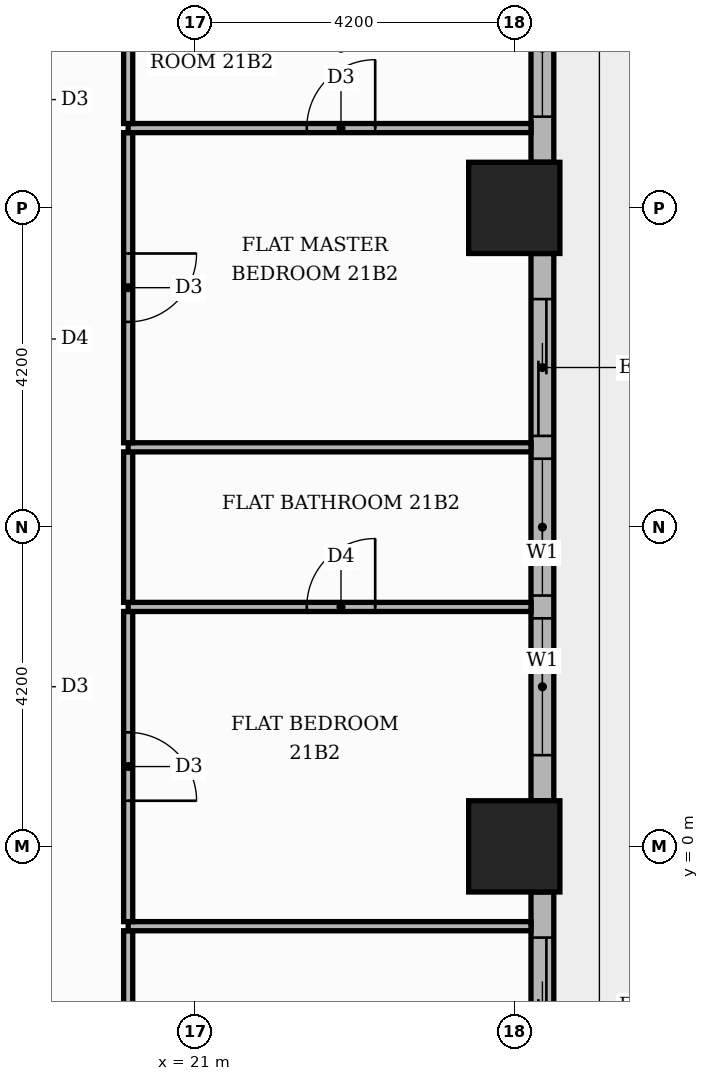
"""IFC4 building model, lengths in metres.
Left out: names, types, materials, properties, quantities, classifications, styles, units other than length and angle.
Written with IfcOpenShell. Run it as: python <this file> out.ifc"""

import sys

from ifc_helpers import new_model, si_unit, direction, frame, frame_2d, origin, origin_2d, place, context, subcontext, project, spatial, rectangle, extrude, element, fill, save


model = new_model("IFC4")
c1 = context("Model", 3, precision=1e-05, world=origin(), true_north=direction((0.0, 1.0)))
c2 = subcontext(c1, "Body", "Model", "MODEL_VIEW")
j1 = project(units=[si_unit("LENGTHUNIT", "METRE"), si_unit("PLANEANGLEUNIT", "RADIAN")], contexts=[c1])
p1 = place(None, origin())
s1 = spatial("IfcSite", under=j1, at=p1, CompositionType="ELEMENT")
p2 = place(p1, origin())
s2 = spatial("IfcBuilding", under=s1, at=p2, CompositionType="ELEMENT")
p3 = place(p2, frame((0.0, 0.0, 90.9)))
s3 = spatial("IfcBuildingStorey", under=s2, at=p3, CompositionType="ELEMENT", Elevation=90.9)
for number, where, z_axis, x_axis in (
    (1, (25.2, 0.0, 0.0), (0.0, 0.0, 1.0), (1.0, 0.0, 0.0)),
    (2, (25.2, 8.4, 0.0), (0.0, 0.0, 1.0), (1.0, 0.0, 0.0)),
):
    element("IfcColumn", number, at=place(p3, frame(where, z_axis=z_axis, x_axis=x_axis)), inside=s3, PredefinedType="COLUMN", context=c2, shape_type="SweptSolid", body=[
        extrude(rectangle(XDim=1.2, YDim=1.2, at=origin_2d()), origin(), (0.0, 0.0, 1.0), 3.9),
    ])
p4 = place(p3, frame((25.57, -7.8, 0.0), z_axis=(0.0, 0.0, 1.0), x_axis=(0.0, 1.0, 0.0)))
e3 = element("IfcWall", 3, at=p4, inside=s3, PredefinedType="STANDARD", context=c2, shape_type="SweptSolid", body=[
    extrude(rectangle(XDim=7.2, YDim=0.3, at=frame_2d((3.6, 0.0))), origin(), (0.0, 0.0, 1.0), 3.48),
])
p5 = place(p4, frame((0.6, 0.0, 0.9)))
e4 = element("IfcOpeningElement", 4, at=p5, cuts=e3, PredefinedType="OPENING", context=c2, shape_type="SweptSolid", body=[
    extrude(rectangle(XDim=1.8, YDim=2.1, at=frame_2d((0.9, 1.05))), frame((0.0, 0.16, 0.0), z_axis=(0.0, -1.0, 0.0), x_axis=(1.0, 0.0, 0.0)), (0.0, 0.0, 1.0), 0.32),
])
p6 = place(p4, frame((2.7, 0.0, 0.9)))
e5 = element("IfcOpeningElement", 5, at=p6, cuts=e3, PredefinedType="OPENING", context=c2, shape_type="SweptSolid", body=[
    extrude(rectangle(XDim=1.8, YDim=2.1, at=frame_2d((0.9, 1.05))), frame((0.0, 0.16, 0.0), z_axis=(0.0, -1.0, 0.0), x_axis=(1.0, 0.0, 0.0)), (0.0, 0.0, 1.0), 0.32),
])
p7 = place(p4, frame((4.8, 0.0, 0.0)))
e6 = element("IfcOpeningElement", 6, at=p7, cuts=e3, PredefinedType="OPENING", context=c2, shape_type="SweptSolid", body=[
    extrude(rectangle(XDim=1.8, YDim=2.4, at=frame_2d((0.9, 1.2))), frame((0.0, 0.16, 0.0), z_axis=(0.0, -1.0, 0.0), x_axis=(1.0, 0.0, 0.0)), (0.0, 0.0, 1.0), 0.32),
])
p8 = place(p3, frame((25.57, 0.6, 0.0), z_axis=(0.0, 0.0, 1.0), x_axis=(0.0, 1.0, 0.0)))
e7 = element("IfcWall", 7, at=p8, inside=s3, PredefinedType="STANDARD", context=c2, shape_type="SweptSolid", body=[
    extrude(rectangle(XDim=7.2, YDim=0.3, at=frame_2d((3.6, 0.0))), origin(), (0.0, 0.0, 1.0), 3.48),
])
p9 = place(p8, frame((0.6, 0.0, 0.9)))
e8 = element("IfcOpeningElement", 8, at=p9, cuts=e7, PredefinedType="OPENING", context=c2, shape_type="SweptSolid", body=[
    extrude(rectangle(XDim=1.8, YDim=2.1, at=frame_2d((0.9, 1.05))), frame((0.0, 0.16, 0.0), z_axis=(0.0, -1.0, 0.0), x_axis=(1.0, 0.0, 0.0)), (0.0, 0.0, 1.0), 0.32),
])
p10 = place(p8, frame((2.7, 0.0, 0.9)))
e9 = element("IfcOpeningElement", 9, at=p10, cuts=e7, PredefinedType="OPENING", context=c2, shape_type="SweptSolid", body=[
    extrude(rectangle(XDim=1.8, YDim=2.1, at=frame_2d((0.9, 1.05))), frame((0.0, 0.16, 0.0), z_axis=(0.0, -1.0, 0.0), x_axis=(1.0, 0.0, 0.0)), (0.0, 0.0, 1.0), 0.32),
])
p11 = place(p8, frame((4.8, 0.0, 0.0)))
e10 = element("IfcOpeningElement", 10, at=p11, cuts=e7, PredefinedType="OPENING", context=c2, shape_type="SweptSolid", body=[
    extrude(rectangle(XDim=1.8, YDim=2.4, at=frame_2d((0.9, 1.2))), frame((0.0, 0.16, 0.0), z_axis=(0.0, -1.0, 0.0), x_axis=(1.0, 0.0, 0.0)), (0.0, 0.0, 1.0), 0.32),
])
p12 = place(p3, frame((25.57, 9.0, 0.0), z_axis=(0.0, 0.0, 1.0), x_axis=(0.0, 1.0, 0.0)))
e11 = element("IfcWall", 11, at=p12, inside=s3, PredefinedType="STANDARD", context=c2, shape_type="SweptSolid", body=[
    extrude(rectangle(XDim=7.2, YDim=0.3, at=frame_2d((3.6, 0.0))), origin(), (0.0, 0.0, 1.0), 3.48),
])
p13 = place(p12, frame((0.6, 0.0, 0.9)))
e12 = element("IfcOpeningElement", 12, at=p13, cuts=e11, PredefinedType="OPENING", context=c2, shape_type="SweptSolid", body=[
    extrude(rectangle(XDim=1.8, YDim=2.1, at=frame_2d((0.9, 1.05))), frame((0.0, 0.16, 0.0), z_axis=(0.0, -1.0, 0.0), x_axis=(1.0, 0.0, 0.0)), (0.0, 0.0, 1.0), 0.32),
])
p14 = place(p12, frame((2.7, 0.0, 0.9)))
e13 = element("IfcOpeningElement", 13, at=p14, cuts=e11, PredefinedType="OPENING", context=c2, shape_type="SweptSolid", body=[
    extrude(rectangle(XDim=1.8, YDim=2.1, at=frame_2d((0.9, 1.05))), frame((0.0, 0.16, 0.0), z_axis=(0.0, -1.0, 0.0), x_axis=(1.0, 0.0, 0.0)), (0.0, 0.0, 1.0), 0.32),
])
p15 = place(p12, frame((4.8, 0.0, 0.9)))
e14 = element("IfcOpeningElement", 14, at=p15, cuts=e11, PredefinedType="OPENING", context=c2, shape_type="SweptSolid", body=[
    extrude(rectangle(XDim=1.8, YDim=2.1, at=frame_2d((0.9, 1.05))), frame((0.0, 0.16, 0.0), z_axis=(0.0, -1.0, 0.0), x_axis=(1.0, 0.0, 0.0)), (0.0, 0.0, 1.0), 0.32),
])
p16 = place(p3, frame((20.12, -5.15, 0.0), z_axis=(0.0, 0.0, 1.0), x_axis=(0.0, 1.0, 0.0)))
e15 = element("IfcWall", 15, at=p16, inside=s3, PredefinedType="PARTITIONING", context=c2, shape_type="SweptSolid", body=[
    extrude(rectangle(XDim=4.04, YDim=0.12, at=frame_2d((2.02, 0.0))), origin(), (0.0, 0.0, 1.0), 3.48),
])
p17 = place(p16, frame((1.5, 0.0, 0.0)))
e16 = element("IfcOpeningElement", 16, at=p17, cuts=e15, PredefinedType="OPENING", context=c2, shape_type="SweptSolid", body=[
    extrude(rectangle(XDim=1.0, YDim=2.1, at=frame_2d((0.5, 1.05))), frame((0.0, 0.07, 0.0), z_axis=(0.0, -1.0, 0.0), x_axis=(1.0, 0.0, 0.0)), (0.0, 0.0, 1.0), 0.14),
])
p18 = place(p3, frame((20.12, -1.05, 0.0), z_axis=(0.0, 0.0, 1.0), x_axis=(1.0, 0.0, 0.0)))
e17 = element("IfcWall", 17, at=p18, inside=s3, PredefinedType="PARTITIONING", context=c2, shape_type="SweptSolid", body=[
    extrude(rectangle(XDim=5.3, YDim=0.12, at=frame_2d((2.65, 0.0))), origin(), (0.0, 0.0, 1.0), 3.48),
])
p19 = place(p3, frame((20.12, -0.99, 0.0), z_axis=(0.0, 0.0, 1.0), x_axis=(0.0, 1.0, 0.0)))
e18 = element("IfcWall", 18, at=p19, inside=s3, PredefinedType="PARTITIONING", context=c2, shape_type="SweptSolid", body=[
    extrude(rectangle(XDim=4.08, YDim=0.12, at=frame_2d((2.04, 0.0))), origin(), (0.0, 0.0, 1.0), 3.48),
])
p20 = place(p19, frame((1.59, 0.0, 0.0)))
e19 = element("IfcOpeningElement", 19, at=p20, cuts=e18, PredefinedType="OPENING", context=c2, shape_type="SweptSolid", body=[
    extrude(rectangle(XDim=0.9, YDim=2.1, at=frame_2d((0.45, 1.05))), frame((0.0, 0.07, 0.0), z_axis=(0.0, -1.0, 0.0), x_axis=(1.0, 0.0, 0.0)), (0.0, 0.0, 1.0), 0.14),
])
p21 = place(p3, frame((20.12, 3.15, 0.0), z_axis=(0.0, 0.0, 1.0), x_axis=(1.0, 0.0, 0.0)))
e20 = element("IfcWall", 20, at=p21, inside=s3, PredefinedType="PARTITIONING", context=c2, shape_type="SweptSolid", body=[
    extrude(rectangle(XDim=5.3, YDim=0.12, at=frame_2d((2.65, 0.0))), origin(), (0.0, 0.0, 1.0), 3.48),
])
p22 = place(p21, frame((2.35, 0.0, 0.0)))
e21 = element("IfcOpeningElement", 21, at=p22, cuts=e20, PredefinedType="OPENING", context=c2, shape_type="SweptSolid", body=[
    extrude(rectangle(XDim=0.9, YDim=2.1, at=frame_2d((0.45, 1.05))), frame((0.0, 0.07, 0.0), z_axis=(0.0, -1.0, 0.0), x_axis=(1.0, 0.0, 0.0)), (0.0, 0.0, 1.0), 0.14),
])
p23 = place(p3, frame((20.12, 3.21, 0.0), z_axis=(0.0, 0.0, 1.0), x_axis=(0.0, 1.0, 0.0)))
e22 = element("IfcWall", 22, at=p23, inside=s3, PredefinedType="PARTITIONING", context=c2, shape_type="SweptSolid", body=[
    extrude(rectangle(XDim=1.98, YDim=0.12, at=frame_2d((0.99, 0.0))), origin(), (0.0, 0.0, 1.0), 3.48),
])
p24 = place(p3, frame((20.12, 5.25, 0.0), z_axis=(0.0, 0.0, 1.0), x_axis=(1.0, 0.0, 0.0)))
e23 = element("IfcWall", 23, at=p24, inside=s3, PredefinedType="PARTITIONING", context=c2, shape_type="SweptSolid", body=[
    extrude(rectangle(XDim=5.3, YDim=0.12, at=frame_2d((2.65, 0.0))), origin(), (0.0, 0.0, 1.0), 3.48),
])
p25 = place(p3, frame((20.12, 5.31, 0.0), z_axis=(0.0, 0.0, 1.0), x_axis=(0.0, 1.0, 0.0)))
e24 = element("IfcWall", 24, at=p25, inside=s3, PredefinedType="PARTITIONING", context=c2, shape_type="SweptSolid", body=[
    extrude(rectangle(XDim=4.08, YDim=0.12, at=frame_2d((2.04, 0.0))), origin(), (0.0, 0.0, 1.0), 3.48),
])
p26 = place(p25, frame((1.59, 0.0, 0.0)))
e25 = element("IfcOpeningElement", 25, at=p26, cuts=e24, PredefinedType="OPENING", context=c2, shape_type="SweptSolid", body=[
    extrude(rectangle(XDim=0.9, YDim=2.1, at=frame_2d((0.45, 1.05))), frame((0.0, 0.07, 0.0), z_axis=(0.0, -1.0, 0.0), x_axis=(1.0, 0.0, 0.0)), (0.0, 0.0, 1.0), 0.14),
])
p27 = place(p3, frame((20.12, 9.45, 0.0), z_axis=(0.0, 0.0, 1.0), x_axis=(1.0, 0.0, 0.0)))
e26 = element("IfcWall", 26, at=p27, inside=s3, PredefinedType="PARTITIONING", context=c2, shape_type="SweptSolid", body=[
    extrude(rectangle(XDim=5.3, YDim=0.12, at=frame_2d((2.65, 0.0))), origin(), (0.0, 0.0, 1.0), 3.48),
])
p28 = place(p27, frame((2.35, 0.0, 0.0)))
e27 = element("IfcOpeningElement", 27, at=p28, cuts=e26, PredefinedType="OPENING", context=c2, shape_type="SweptSolid", body=[
    extrude(rectangle(XDim=0.9, YDim=2.1, at=frame_2d((0.45, 1.05))), frame((0.0, 0.07, 0.0), z_axis=(0.0, -1.0, 0.0), x_axis=(1.0, 0.0, 0.0)), (0.0, 0.0, 1.0), 0.14),
])
p29 = place(p3, frame((20.12, 9.51, 0.0), z_axis=(0.0, 0.0, 1.0), x_axis=(0.0, 1.0, 0.0)))
e28 = element("IfcWall", 28, at=p29, inside=s3, PredefinedType="PARTITIONING", context=c2, shape_type="SweptSolid", body=[
    extrude(rectangle(XDim=1.98, YDim=0.12, at=frame_2d((0.99, 0.0))), origin(), (0.0, 0.0, 1.0), 3.48),
])
p30 = place(p7, origin())
e29 = element("IfcDoor", 29, at=p30, inside=s3, OperationType="SLIDING_TO_RIGHT", PredefinedType="DOOR", context=c2, shape_type="SweptSolid", body=[
    extrude(rectangle(XDim=1.8, YDim=2.4, at=frame_2d((0.9, 1.2))), frame((0.0, 0.025, 0.0), z_axis=(0.0, -1.0, 0.0), x_axis=(1.0, 0.0, 0.0)), (0.0, 0.0, 1.0), 0.05),
])
fill(e6, e29)
p31 = place(p9, origin())
e30 = element("IfcWindow", 30, at=p31, inside=s3, PartitioningType="SINGLE_PANEL", PredefinedType="WINDOW", context=c2, shape_type="SweptSolid", body=[
    extrude(rectangle(XDim=1.8, YDim=2.1, at=frame_2d((0.9, 1.05))), frame((0.0, 0.03, 0.0), z_axis=(0.0, -1.0, 0.0), x_axis=(1.0, 0.0, 0.0)), (0.0, 0.0, 1.0), 0.06),
])
fill(e8, e30)
p32 = place(p10, origin())
e31 = element("IfcWindow", 31, at=p32, inside=s3, PartitioningType="SINGLE_PANEL", PredefinedType="WINDOW", context=c2, shape_type="SweptSolid", body=[
    extrude(rectangle(XDim=1.8, YDim=2.1, at=frame_2d((0.9, 1.05))), frame((0.0, 0.03, 0.0), z_axis=(0.0, -1.0, 0.0), x_axis=(1.0, 0.0, 0.0)), (0.0, 0.0, 1.0), 0.06),
])
fill(e9, e31)
p33 = place(p11, origin())
e32 = element("IfcDoor", 32, at=p33, inside=s3, OperationType="SLIDING_TO_RIGHT", PredefinedType="DOOR", context=c2, shape_type="SweptSolid", body=[
    extrude(rectangle(XDim=1.8, YDim=2.4, at=frame_2d((0.9, 1.2))), frame((0.0, 0.025, 0.0), z_axis=(0.0, -1.0, 0.0), x_axis=(1.0, 0.0, 0.0)), (0.0, 0.0, 1.0), 0.05),
])
fill(e10, e32)
p34 = place(p13, origin())
e33 = element("IfcWindow", 33, at=p34, inside=s3, PartitioningType="SINGLE_PANEL", PredefinedType="WINDOW", context=c2, shape_type="SweptSolid", body=[
    extrude(rectangle(XDim=1.8, YDim=2.1, at=frame_2d((0.9, 1.05))), frame((0.0, 0.03, 0.0), z_axis=(0.0, -1.0, 0.0), x_axis=(1.0, 0.0, 0.0)), (0.0, 0.0, 1.0), 0.06),
])
fill(e12, e33)
p35 = place(p20, frame((0.9, 0.0, 0.0), z_axis=(0.0, 0.0, 1.0), x_axis=(-1.0, 0.0, 0.0)))
e34 = element("IfcDoor", 34, at=p35, inside=s3, OperationType="SINGLE_SWING_LEFT", PredefinedType="DOOR", context=c2, shape_type="SweptSolid", body=[
    extrude(rectangle(XDim=0.9, YDim=2.1, at=frame_2d((0.45, 1.05))), frame((0.0, 0.025, 0.0), z_axis=(0.0, -1.0, 0.0), x_axis=(1.0, 0.0, 0.0)), (0.0, 0.0, 1.0), 0.05),
])
fill(e19, e34)
p36 = place(p22, origin())
e35 = element("IfcDoor", 35, at=p36, inside=s3, OperationType="SINGLE_SWING_RIGHT", PredefinedType="DOOR", context=c2, shape_type="SweptSolid", body=[
    extrude(rectangle(XDim=0.9, YDim=2.1, at=frame_2d((0.45, 1.05))), frame((0.0, 0.025, 0.0), z_axis=(0.0, -1.0, 0.0), x_axis=(1.0, 0.0, 0.0)), (0.0, 0.0, 1.0), 0.05),
])
fill(e21, e35)
p37 = place(p26, frame((0.9, 0.0, 0.0), z_axis=(0.0, 0.0, 1.0), x_axis=(-1.0, 0.0, 0.0)))
e36 = element("IfcDoor", 36, at=p37, inside=s3, OperationType="SINGLE_SWING_RIGHT", PredefinedType="DOOR", context=c2, shape_type="SweptSolid", body=[
    extrude(rectangle(XDim=0.9, YDim=2.1, at=frame_2d((0.45, 1.05))), frame((0.0, 0.025, 0.0), z_axis=(0.0, -1.0, 0.0), x_axis=(1.0, 0.0, 0.0)), (0.0, 0.0, 1.0), 0.05),
])
fill(e25, e36)
p38 = place(p28, origin())
e37 = element("IfcDoor", 37, at=p38, inside=s3, OperationType="SINGLE_SWING_RIGHT", PredefinedType="DOOR", context=c2, shape_type="SweptSolid", body=[
    extrude(rectangle(XDim=0.9, YDim=2.1, at=frame_2d((0.45, 1.05))), frame((0.0, 0.025, 0.0), z_axis=(0.0, -1.0, 0.0), x_axis=(1.0, 0.0, 0.0)), (0.0, 0.0, 1.0), 0.05),
])
fill(e27, e37)
save(model, sys.argv[1])
